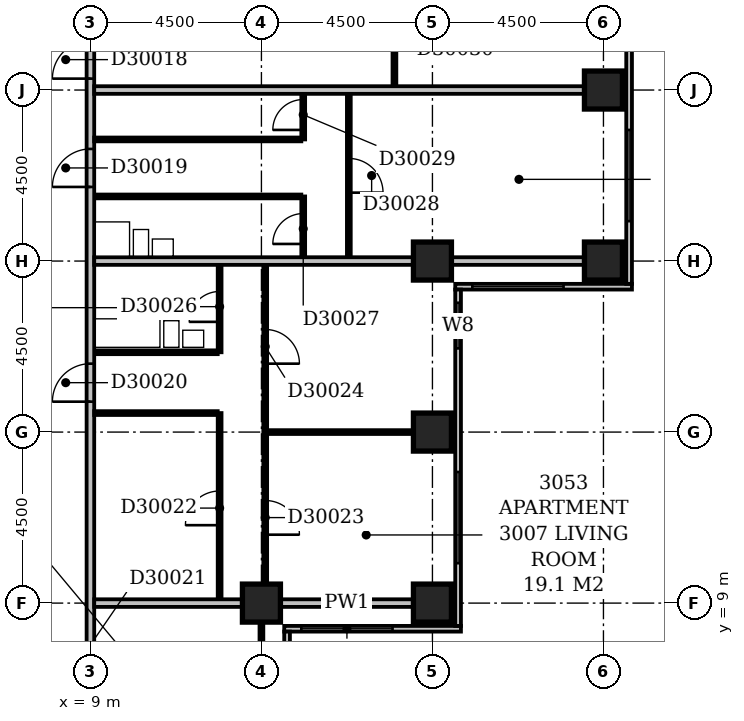
"""IFC4 building model, lengths in metres.
Left out: names, types, materials, properties, quantities, classifications, styles, units other than length and angle.
Written with IfcOpenShell. Run it as: python <this file> out.ifc"""

import sys

from ifc_helpers import new_model, si_unit, direction, frame, frame_2d, origin, origin_2d, place, context, subcontext, project, spatial, rectangle, extrude, element, fill, save


model = new_model("IFC4")
c1 = context("Model", 3, precision=1e-05, world=origin(), true_north=direction((0.0, 1.0)))
c2 = subcontext(c1, "Body", "Model", "MODEL_VIEW")
j1 = project(units=[si_unit("LENGTHUNIT", "METRE"), si_unit("PLANEANGLEUNIT", "RADIAN")], contexts=[c1])
p1 = place(None, origin())
s1 = spatial("IfcSite", under=j1, at=p1, CompositionType="ELEMENT")
p2 = place(p1, origin())
s2 = spatial("IfcBuilding", under=s1, at=p2, CompositionType="ELEMENT")
p3 = place(p2, frame((0.0, 0.0, 123.2)))
s3 = spatial("IfcBuildingStorey", under=s2, at=p3, CompositionType="ELEMENT", Elevation=123.2)
for number, where, z_axis, x_axis in (
    (1, (13.5, 9.0, -0.3), (0.0, 0.0, 1.0), (1.0, 0.0, 0.0)),
    (2, (18.0, 9.0, -0.3), (0.0, 0.0, 1.0), (1.0, 0.0, 0.0)),
    (3, (18.0, 13.5, -0.3), (0.0, 0.0, 1.0), (1.0, 0.0, 0.0)),
    (4, (18.0, 18.0, -0.3), (0.0, 0.0, 1.0), (1.0, 0.0, 0.0)),
    (5, (22.5, 18.0, -0.3), (0.0, 0.0, 1.0), (1.0, 0.0, 0.0)),
    (6, (22.5, 22.5, -0.3), (0.0, 0.0, 1.0), (1.0, 0.0, 0.0)),
):
    element("IfcColumn", number, at=place(p3, frame(where, z_axis=z_axis, x_axis=x_axis)), inside=s3, PredefinedType="COLUMN", context=c2, shape_type="SweptSolid", body=[
        extrude(rectangle(XDim=1.0, YDim=1.0, at=origin_2d()), origin(), (0.0, 0.0, 1.0), 3.6),
    ])
p4 = place(p3, frame((14.175, 3.9, 0.0), z_axis=(0.0, 0.0, 1.0), x_axis=(0.0, 1.0, 0.0)))
e7 = element("IfcWall", 7, at=p4, inside=s3, PredefinedType="STANDARD", context=c2, shape_type="SweptSolid", body=[
    extrude(rectangle(XDim=4.35, YDim=0.15, at=frame_2d((2.175, 0.0))), origin(), (0.0, 0.0, 1.0), 2.7),
])
p5 = place(p4, frame((1.65, 0.0, 0.6)))
e8 = element("IfcOpeningElement", 8, at=p5, cuts=e7, PredefinedType="OPENING", context=c2, shape_type="SweptSolid", body=[
    extrude(rectangle(XDim=2.4, YDim=1.8, at=frame_2d((1.2, 0.9))), frame((0.0, 0.087, 0.0), z_axis=(0.0, -1.0, 0.0), x_axis=(1.0, 0.0, 0.0)), (0.0, 0.0, 1.0), 0.174),
])
p6 = place(p3, frame((14.1, 8.325, 0.0), z_axis=(0.0, 0.0, 1.0), x_axis=(1.0, 0.0, 0.0)))
e9 = element("IfcWall", 9, at=p6, inside=s3, PredefinedType="STANDARD", context=c2, shape_type="SweptSolid", body=[
    extrude(rectangle(XDim=4.65, YDim=0.15, at=frame_2d((2.325, 0.0))), origin(), (0.0, 0.0, 1.0), 2.7),
])
p7 = place(p6, frame((0.45, 0.0, 0.6)))
e10 = element("IfcOpeningElement", 10, at=p7, cuts=e9, PredefinedType="OPENING", context=c2, shape_type="SweptSolid", body=[
    extrude(rectangle(XDim=2.4, YDim=1.8, at=frame_2d((1.2, 0.9))), frame((0.0, 0.087, 0.0), z_axis=(0.0, -1.0, 0.0), x_axis=(1.0, 0.0, 0.0)), (0.0, 0.0, 1.0), 0.174),
])
p8 = place(p3, frame((18.675, 8.4, 0.0), z_axis=(0.0, 0.0, 1.0), x_axis=(0.0, 1.0, 0.0)))
e11 = element("IfcWall", 11, at=p8, inside=s3, PredefinedType="STANDARD", context=c2, shape_type="SweptSolid", body=[
    extrude(rectangle(XDim=8.85, YDim=0.15, at=frame_2d((4.425, 0.0))), origin(), (0.0, 0.0, 1.0), 2.7),
])
p9 = place(p8, frame((1.65, 0.0, 0.6)))
e12 = element("IfcOpeningElement", 12, at=p9, cuts=e11, PredefinedType="OPENING", context=c2, shape_type="SweptSolid", body=[
    extrude(rectangle(XDim=2.4, YDim=1.8, at=frame_2d((1.2, 0.9))), frame((0.0, 0.087, 0.0), z_axis=(0.0, -1.0, 0.0), x_axis=(1.0, 0.0, 0.0)), (0.0, 0.0, 1.0), 0.174),
])
p10 = place(p8, frame((7.302, 0.0, 0.6)))
e13 = element("IfcOpeningElement", 13, at=p10, cuts=e11, PredefinedType="OPENING", context=c2, shape_type="SweptSolid", body=[
    extrude(rectangle(XDim=1.2, YDim=1.8, at=frame_2d((0.6, 0.9))), frame((0.0, 0.087, 0.0), z_axis=(0.0, -1.0, 0.0), x_axis=(1.0, 0.0, 0.0)), (0.0, 0.0, 1.0), 0.174),
])
p11 = place(p3, frame((18.6, 17.325, 0.0), z_axis=(0.0, 0.0, 1.0), x_axis=(1.0, 0.0, 0.0)))
e14 = element("IfcWall", 14, at=p11, inside=s3, PredefinedType="STANDARD", context=c2, shape_type="SweptSolid", body=[
    extrude(rectangle(XDim=4.65, YDim=0.15, at=frame_2d((2.325, 0.0))), origin(), (0.0, 0.0, 1.0), 2.7),
])
p12 = place(p11, frame((0.45, 0.0, 0.6)))
e15 = element("IfcOpeningElement", 15, at=p12, cuts=e14, PredefinedType="OPENING", context=c2, shape_type="SweptSolid", body=[
    extrude(rectangle(XDim=2.4, YDim=1.8, at=frame_2d((1.2, 0.9))), frame((0.0, 0.087, 0.0), z_axis=(0.0, -1.0, 0.0), x_axis=(1.0, 0.0, 0.0)), (0.0, 0.0, 1.0), 0.174),
])
p13 = place(p3, frame((23.175, 17.4, 0.0), z_axis=(0.0, 0.0, 1.0), x_axis=(0.0, 1.0, 0.0)))
e16 = element("IfcWall", 16, at=p13, inside=s3, PredefinedType="STANDARD", context=c2, shape_type="SweptSolid", body=[
    extrude(rectangle(XDim=17.85, YDim=0.15, at=frame_2d((8.925, 0.0))), origin(), (0.0, 0.0, 1.0), 2.7),
])
p14 = place(p13, frame((1.65, 0.0, 0.6)))
e17 = element("IfcOpeningElement", 17, at=p14, cuts=e16, PredefinedType="OPENING", context=c2, shape_type="SweptSolid", body=[
    extrude(rectangle(XDim=2.4, YDim=1.8, at=frame_2d((1.2, 0.9))), frame((0.0, 0.087, 0.0), z_axis=(0.0, -1.0, 0.0), x_axis=(1.0, 0.0, 0.0)), (0.0, 0.0, 1.0), 0.174),
])
p15 = place(p13, frame((6.15, 0.0, 0.6)))
e18 = element("IfcOpeningElement", 18, at=p15, cuts=e16, PredefinedType="OPENING", context=c2, shape_type="SweptSolid", body=[
    extrude(rectangle(XDim=2.4, YDim=1.8, at=frame_2d((1.2, 0.9))), frame((0.0, 0.087, 0.0), z_axis=(0.0, -1.0, 0.0), x_axis=(1.0, 0.0, 0.0)), (0.0, 0.0, 1.0), 0.174),
])
p16 = place(p13, frame((10.433, 0.0, 0.6)))
e19 = element("IfcOpeningElement", 19, at=p16, cuts=e16, PredefinedType="OPENING", context=c2, shape_type="SweptSolid", body=[
    extrude(rectangle(XDim=1.5, YDim=1.8, at=frame_2d((0.75, 0.9))), frame((0.0, 0.087, 0.0), z_axis=(0.0, -1.0, 0.0), x_axis=(1.0, 0.0, 0.0)), (0.0, 0.0, 1.0), 0.174),
])
p17 = place(p13, frame((15.15, 0.0, 0.6)))
e20 = element("IfcOpeningElement", 20, at=p17, cuts=e16, PredefinedType="OPENING", context=c2, shape_type="SweptSolid", body=[
    extrude(rectangle(XDim=2.4, YDim=1.8, at=frame_2d((1.2, 0.9))), frame((0.0, 0.087, 0.0), z_axis=(0.0, -1.0, 0.0), x_axis=(1.0, 0.0, 0.0)), (0.0, 0.0, 1.0), 0.174),
])
p18 = place(p3, frame((9.0, 5.0, 0.0), z_axis=(0.0, 0.0, 1.0), x_axis=(0.0, 1.0, 0.0)))
e21 = element("IfcWall", 21, at=p18, inside=s3, PredefinedType="PARTITIONING", context=c2, shape_type="SweptSolid", body=[
    extrude(rectangle(XDim=27.75, YDim=0.2, at=frame_2d((13.875, 0.0))), origin(), (0.0, 0.0, 1.0), 3.3),
])
p19 = place(p18, frame((17.8, 0.0, 0.0)))
e22 = element("IfcOpeningElement", 22, at=p19, cuts=e21, PredefinedType="OPENING", context=c2, shape_type="SweptSolid", body=[
    extrude(rectangle(XDim=1.0, YDim=2.1, at=frame_2d((0.5, 1.05))), frame((0.0, 0.112, 0.0), z_axis=(0.0, -1.0, 0.0), x_axis=(1.0, 0.0, 0.0)), (0.0, 0.0, 1.0), 0.224),
])
p20 = place(p18, frame((14.95, 0.0, 0.0)))
e23 = element("IfcOpeningElement", 23, at=p20, cuts=e21, PredefinedType="OPENING", context=c2, shape_type="SweptSolid", body=[
    extrude(rectangle(XDim=1.0, YDim=2.1, at=frame_2d((0.5, 1.05))), frame((0.0, 0.112, 0.0), z_axis=(0.0, -1.0, 0.0), x_axis=(1.0, 0.0, 0.0)), (0.0, 0.0, 1.0), 0.224),
])
p21 = place(p18, frame((9.3, 0.0, 0.0)))
e24 = element("IfcOpeningElement", 24, at=p21, cuts=e21, PredefinedType="OPENING", context=c2, shape_type="SweptSolid", body=[
    extrude(rectangle(XDim=1.0, YDim=2.1, at=frame_2d((0.5, 1.05))), frame((0.0, 0.112, 0.0), z_axis=(0.0, -1.0, 0.0), x_axis=(1.0, 0.0, 0.0)), (0.0, 0.0, 1.0), 0.224),
])
p22 = place(p18, frame((1.5, 0.0, 0.0)))
e25 = element("IfcOpeningElement", 25, at=p22, cuts=e21, PredefinedType="OPENING", context=c2, shape_type="SweptSolid", body=[
    extrude(rectangle(XDim=0.9, YDim=2.1, at=frame_2d((0.45, 1.05))), frame((0.0, 0.112, 0.0), z_axis=(0.0, -1.0, 0.0), x_axis=(1.0, 0.0, 0.0)), (0.0, 0.0, 1.0), 0.224),
])
p23 = place(p3, frame((13.5, 5.0, 0.0), z_axis=(0.0, 0.0, 1.0), x_axis=(0.0, 1.0, 0.0)))
e26 = element("IfcWall", 26, at=p23, inside=s3, PredefinedType="PARTITIONING", context=c2, shape_type="SweptSolid", body=[
    extrude(rectangle(XDim=3.5, YDim=0.1, at=frame_2d((1.75, 0.0))), origin(), (0.0, 0.0, 1.0), 2.7),
])
p24 = place(p3, frame((9.1, 9.0, 0.0), z_axis=(0.0, 0.0, 1.0), x_axis=(1.0, 0.0, 0.0)))
e27 = element("IfcWall", 27, at=p24, inside=s3, PredefinedType="PARTITIONING", context=c2, shape_type="SweptSolid", body=[
    extrude(rectangle(XDim=3.9, YDim=0.2, at=frame_2d((1.95, 0.0))), origin(), (0.0, 0.0, 1.0), 3.3),
])
p25 = place(p3, frame((14.0, 9.0, 0.0), z_axis=(0.0, 0.0, 1.0), x_axis=(1.0, 0.0, 0.0)))
e28 = element("IfcWall", 28, at=p25, inside=s3, PredefinedType="PARTITIONING", context=c2, shape_type="SweptSolid", body=[
    extrude(rectangle(XDim=3.5, YDim=0.2, at=frame_2d((1.75, 0.0))), origin(), (0.0, 0.0, 1.0), 2.7),
])
p26 = place(p3, frame((12.4, 9.1, 0.0), z_axis=(0.0, 0.0, 1.0), x_axis=(0.0, 1.0, 0.0)))
e29 = element("IfcWall", 29, at=p26, inside=s3, PredefinedType="PARTITIONING", context=c2, shape_type="SweptSolid", body=[
    extrude(rectangle(XDim=4.9, YDim=0.1, at=frame_2d((2.45, 0.0))), origin(), (0.0, 0.0, 1.0), 3.3),
])
p27 = place(p26, frame((1.95, 0.0, 0.0)))
e30 = element("IfcOpeningElement", 30, at=p27, cuts=e29, PredefinedType="OPENING", context=c2, shape_type="SweptSolid", body=[
    extrude(rectangle(XDim=0.9, YDim=2.1, at=frame_2d((0.45, 1.05))), frame((0.0, 0.062, 0.0), z_axis=(0.0, -1.0, 0.0), x_axis=(1.0, 0.0, 0.0)), (0.0, 0.0, 1.0), 0.124),
])
p28 = place(p3, frame((13.6, 9.5, 0.0), z_axis=(0.0, 0.0, 1.0), x_axis=(0.0, 1.0, 0.0)))
e31 = element("IfcWall", 31, at=p28, inside=s3, PredefinedType="PARTITIONING", context=c2, shape_type="SweptSolid", body=[
    extrude(rectangle(XDim=8.4, YDim=0.1, at=frame_2d((4.2, 0.0))), origin(), (0.0, 0.0, 1.0), 3.3),
])
p29 = place(p28, frame((1.3, 0.0, 0.0)))
e32 = element("IfcOpeningElement", 32, at=p29, cuts=e31, PredefinedType="OPENING", context=c2, shape_type="SweptSolid", body=[
    extrude(rectangle(XDim=0.9, YDim=2.1, at=frame_2d((0.45, 1.05))), frame((0.0, 0.062, 0.0), z_axis=(0.0, -1.0, 0.0), x_axis=(1.0, 0.0, 0.0)), (0.0, 0.0, 1.0), 0.124),
])
p30 = place(p28, frame((5.8, 0.0, 0.0)))
e33 = element("IfcOpeningElement", 33, at=p30, cuts=e31, PredefinedType="OPENING", context=c2, shape_type="SweptSolid", body=[
    extrude(rectangle(XDim=0.9, YDim=2.1, at=frame_2d((0.45, 1.05))), frame((0.0, 0.062, 0.0), z_axis=(0.0, -1.0, 0.0), x_axis=(1.0, 0.0, 0.0)), (0.0, 0.0, 1.0), 0.124),
])
p31 = place(p3, frame((13.65, 13.5, 0.0), z_axis=(0.0, 0.0, 1.0), x_axis=(1.0, 0.0, 0.0)))
e34 = element("IfcWall", 34, at=p31, inside=s3, PredefinedType="PARTITIONING", context=c2, shape_type="SweptSolid", body=[
    extrude(rectangle(XDim=3.85, YDim=0.1, at=frame_2d((1.925, 0.0))), origin(), (0.0, 0.0, 1.0), 3.3),
])
p32 = place(p3, frame((9.1, 14.0, 0.0), z_axis=(0.0, 0.0, 1.0), x_axis=(1.0, 0.0, 0.0)))
e35 = element("IfcWall", 35, at=p32, inside=s3, PredefinedType="PARTITIONING", context=c2, shape_type="SweptSolid", body=[
    extrude(rectangle(XDim=3.25, YDim=0.1, at=frame_2d((1.625, 0.0))), origin(), (0.0, 0.0, 1.0), 3.3),
])
p33 = place(p3, frame((9.1, 15.6, 0.0), z_axis=(0.0, 0.0, 1.0), x_axis=(1.0, 0.0, 0.0)))
e36 = element("IfcWall", 36, at=p33, inside=s3, PredefinedType="PLUMBINGWALL", context=c2, shape_type="SweptSolid", body=[
    extrude(rectangle(XDim=3.25, YDim=0.1, at=frame_2d((1.625, 0.0))), origin(), (0.0, 0.0, 1.0), 3.3),
])
p34 = place(p3, frame((12.4, 15.6, 0.0), z_axis=(0.0, 0.0, 1.0), x_axis=(0.0, 1.0, 0.0)))
e37 = element("IfcWall", 37, at=p34, inside=s3, PredefinedType="PARTITIONING", context=c2, shape_type="SweptSolid", body=[
    extrude(rectangle(XDim=2.3, YDim=0.1, at=frame_2d((1.15, 0.0))), origin(), (0.0, 0.0, 1.0), 3.3),
])
p35 = place(p34, frame((0.8, 0.0, 0.0)))
e38 = element("IfcOpeningElement", 38, at=p35, cuts=e37, PredefinedType="OPENING", context=c2, shape_type="SweptSolid", body=[
    extrude(rectangle(XDim=0.8, YDim=2.1, at=frame_2d((0.4, 1.05))), frame((0.0, 0.062, 0.0), z_axis=(0.0, -1.0, 0.0), x_axis=(1.0, 0.0, 0.0)), (0.0, 0.0, 1.0), 0.124),
])
p36 = place(p3, frame((9.1, 18.0, 0.0), z_axis=(0.0, 0.0, 1.0), x_axis=(1.0, 0.0, 0.0)))
e39 = element("IfcWall", 39, at=p36, inside=s3, PredefinedType="PARTITIONING", context=c2, shape_type="SweptSolid", body=[
    extrude(rectangle(XDim=8.4, YDim=0.2, at=frame_2d((4.2, 0.0))), origin(), (0.0, 0.0, 1.0), 2.6),
])
p37 = place(p3, frame((18.5, 18.0, 0.0), z_axis=(0.0, 0.0, 1.0), x_axis=(1.0, 0.0, 0.0)))
e40 = element("IfcWall", 40, at=p37, inside=s3, PredefinedType="PARTITIONING", context=c2, shape_type="SweptSolid", body=[
    extrude(rectangle(XDim=3.5, YDim=0.2, at=frame_2d((1.75, 0.0))), origin(), (0.0, 0.0, 1.0), 2.7),
])
p38 = place(p3, frame((14.6, 18.1, 0.0), z_axis=(0.0, 0.0, 1.0), x_axis=(0.0, 1.0, 0.0)))
e41 = element("IfcWall", 41, at=p38, inside=s3, PredefinedType="PARTITIONING", context=c2, shape_type="SweptSolid", body=[
    extrude(rectangle(XDim=1.6, YDim=0.1, at=frame_2d((0.8, 0.0))), origin(), (0.0, 0.0, 1.0), 3.3),
])
p39 = place(p38, frame((0.35, 0.0, 0.0)))
e42 = element("IfcOpeningElement", 42, at=p39, cuts=e41, PredefinedType="OPENING", context=c2, shape_type="SweptSolid", body=[
    extrude(rectangle(XDim=0.8, YDim=2.1, at=frame_2d((0.4, 1.05))), frame((0.0, 0.062, 0.0), z_axis=(0.0, -1.0, 0.0), x_axis=(1.0, 0.0, 0.0)), (0.0, 0.0, 1.0), 0.124),
])
p40 = place(p3, frame((15.8, 18.1, 0.0), z_axis=(0.0, 0.0, 1.0), x_axis=(0.0, 1.0, 0.0)))
e43 = element("IfcWall", 43, at=p40, inside=s3, PredefinedType="PARTITIONING", context=c2, shape_type="SweptSolid", body=[
    extrude(rectangle(XDim=4.3, YDim=0.1, at=frame_2d((2.15, 0.0))), origin(), (0.0, 0.0, 1.0), 3.3),
])
p41 = place(p40, frame((1.7, 0.0, 0.0)))
e44 = element("IfcOpeningElement", 44, at=p41, cuts=e43, PredefinedType="OPENING", context=c2, shape_type="SweptSolid", body=[
    extrude(rectangle(XDim=0.9, YDim=2.1, at=frame_2d((0.45, 1.05))), frame((0.0, 0.062, 0.0), z_axis=(0.0, -1.0, 0.0), x_axis=(1.0, 0.0, 0.0)), (0.0, 0.0, 1.0), 0.124),
])
p42 = place(p3, frame((9.1, 19.7, 0.0), z_axis=(0.0, 0.0, 1.0), x_axis=(1.0, 0.0, 0.0)))
e45 = element("IfcWall", 45, at=p42, inside=s3, PredefinedType="PLUMBINGWALL", context=c2, shape_type="SweptSolid", body=[
    extrude(rectangle(XDim=5.45, YDim=0.1, at=frame_2d((2.725, 0.0))), origin(), (0.0, 0.0, 1.0), 3.3),
])
p43 = place(p3, frame((9.1, 21.2, 0.0), z_axis=(0.0, 0.0, 1.0), x_axis=(1.0, 0.0, 0.0)))
e46 = element("IfcWall", 46, at=p43, inside=s3, PredefinedType="PARTITIONING", context=c2, shape_type="SweptSolid", body=[
    extrude(rectangle(XDim=5.45, YDim=0.1, at=frame_2d((2.725, 0.0))), origin(), (0.0, 0.0, 1.0), 3.3),
])
p44 = place(p3, frame((14.6, 21.2, 0.0), z_axis=(0.0, 0.0, 1.0), x_axis=(0.0, 1.0, 0.0)))
e47 = element("IfcWall", 47, at=p44, inside=s3, PredefinedType="PARTITIONING", context=c2, shape_type="SweptSolid", body=[
    extrude(rectangle(XDim=1.2, YDim=0.1, at=frame_2d((0.6, 0.0))), origin(), (0.0, 0.0, 1.0), 3.3),
])
p45 = place(p44, frame((0.25, 0.0, 0.0)))
e48 = element("IfcOpeningElement", 48, at=p45, cuts=e47, PredefinedType="OPENING", context=c2, shape_type="SweptSolid", body=[
    extrude(rectangle(XDim=0.8, YDim=2.1, at=frame_2d((0.4, 1.05))), frame((0.0, 0.062, 0.0), z_axis=(0.0, -1.0, 0.0), x_axis=(1.0, 0.0, 0.0)), (0.0, 0.0, 1.0), 0.124),
])
p46 = place(p3, frame((9.1, 22.5, 0.0), z_axis=(0.0, 0.0, 1.0), x_axis=(1.0, 0.0, 0.0)))
e49 = element("IfcWall", 49, at=p46, inside=s3, PredefinedType="PARTITIONING", context=c2, shape_type="SweptSolid", body=[
    extrude(rectangle(XDim=12.9, YDim=0.2, at=frame_2d((6.45, 0.0))), origin(), (0.0, 0.0, 1.0), 3.3),
])
p47 = place(p3, frame((17.0, 22.6, 0.0), z_axis=(0.0, 0.0, 1.0), x_axis=(0.0, 1.0, 0.0)))
e50 = element("IfcWall", 50, at=p47, inside=s3, PredefinedType="PARTITIONING", context=c2, shape_type="SweptSolid", body=[
    extrude(rectangle(XDim=8.8, YDim=0.1, at=frame_2d((4.4, 0.0))), origin(), (0.0, 0.0, 1.0), 3.3),
])
p48 = place(p47, frame((1.7, 0.0, 0.0)))
e51 = element("IfcOpeningElement", 51, at=p48, cuts=e50, PredefinedType="OPENING", context=c2, shape_type="SweptSolid", body=[
    extrude(rectangle(XDim=0.9, YDim=2.1, at=frame_2d((0.45, 1.05))), frame((0.0, 0.062, 0.0), z_axis=(0.0, -1.0, 0.0), x_axis=(1.0, 0.0, 0.0)), (0.0, 0.0, 1.0), 0.124),
])
p49 = place(p47, frame((6.2, 0.0, 0.0)))
e52 = element("IfcOpeningElement", 52, at=p49, cuts=e50, PredefinedType="OPENING", context=c2, shape_type="SweptSolid", body=[
    extrude(rectangle(XDim=0.9, YDim=2.1, at=frame_2d((0.45, 1.05))), frame((0.0, 0.062, 0.0), z_axis=(0.0, -1.0, 0.0), x_axis=(1.0, 0.0, 0.0)), (0.0, 0.0, 1.0), 0.124),
])
p50 = place(p7, origin())
e53 = element("IfcWindow", 53, at=p50, inside=s3, PartitioningType="SINGLE_PANEL", PredefinedType="WINDOW", context=c2, shape_type="SweptSolid", body=[
    extrude(rectangle(XDim=2.4, YDim=1.8, at=frame_2d((1.2, 0.9))), frame((0.0, 0.03, 0.0), z_axis=(0.0, -1.0, 0.0), x_axis=(1.0, 0.0, 0.0)), (0.0, 0.0, 1.0), 0.06),
])
fill(e10, e53)
p51 = place(p9, origin())
e54 = element("IfcWindow", 54, at=p51, inside=s3, PartitioningType="SINGLE_PANEL", PredefinedType="WINDOW", context=c2, shape_type="SweptSolid", body=[
    extrude(rectangle(XDim=2.4, YDim=1.8, at=frame_2d((1.2, 0.9))), frame((0.0, 0.03, 0.0), z_axis=(0.0, -1.0, 0.0), x_axis=(1.0, 0.0, 0.0)), (0.0, 0.0, 1.0), 0.06),
])
fill(e12, e54)
p52 = place(p10, origin())
e55 = element("IfcWindow", 55, at=p52, inside=s3, PartitioningType="SINGLE_PANEL", PredefinedType="WINDOW", context=c2, shape_type="SweptSolid", body=[
    extrude(rectangle(XDim=1.2, YDim=1.8, at=frame_2d((0.6, 0.9))), frame((0.0, 0.03, 0.0), z_axis=(0.0, -1.0, 0.0), x_axis=(1.0, 0.0, 0.0)), (0.0, 0.0, 1.0), 0.06),
])
fill(e13, e55)
p53 = place(p12, origin())
e56 = element("IfcWindow", 56, at=p53, inside=s3, PartitioningType="SINGLE_PANEL", PredefinedType="WINDOW", context=c2, shape_type="SweptSolid", body=[
    extrude(rectangle(XDim=2.4, YDim=1.8, at=frame_2d((1.2, 0.9))), frame((0.0, 0.03, 0.0), z_axis=(0.0, -1.0, 0.0), x_axis=(1.0, 0.0, 0.0)), (0.0, 0.0, 1.0), 0.06),
])
fill(e15, e56)
p54 = place(p14, origin())
e57 = element("IfcWindow", 57, at=p54, inside=s3, PartitioningType="SINGLE_PANEL", PredefinedType="WINDOW", context=c2, shape_type="SweptSolid", body=[
    extrude(rectangle(XDim=2.4, YDim=1.8, at=frame_2d((1.2, 0.9))), frame((0.0, 0.03, 0.0), z_axis=(0.0, -1.0, 0.0), x_axis=(1.0, 0.0, 0.0)), (0.0, 0.0, 1.0), 0.06),
])
fill(e17, e57)
p55 = place(p19, origin())
e58 = element("IfcDoor", 58, at=p55, inside=s3, OperationType="SINGLE_SWING_LEFT", PredefinedType="DOOR", context=c2, shape_type="SweptSolid", body=[
    extrude(rectangle(XDim=1.0, YDim=2.1, at=frame_2d((0.5, 1.05))), frame((0.0, 0.025, 0.0), z_axis=(0.0, -1.0, 0.0), x_axis=(1.0, 0.0, 0.0)), (0.0, 0.0, 1.0), 0.05),
])
fill(e22, e58)
p56 = place(p20, origin())
e59 = element("IfcDoor", 59, at=p56, inside=s3, OperationType="SINGLE_SWING_LEFT", PredefinedType="DOOR", context=c2, shape_type="SweptSolid", body=[
    extrude(rectangle(XDim=1.0, YDim=2.1, at=frame_2d((0.5, 1.05))), frame((0.0, 0.025, 0.0), z_axis=(0.0, -1.0, 0.0), x_axis=(1.0, 0.0, 0.0)), (0.0, 0.0, 1.0), 0.05),
])
fill(e23, e59)
p57 = place(p21, origin())
e60 = element("IfcDoor", 60, at=p57, inside=s3, OperationType="SINGLE_SWING_LEFT", PredefinedType="DOOR", context=c2, shape_type="SweptSolid", body=[
    extrude(rectangle(XDim=1.0, YDim=2.1, at=frame_2d((0.5, 1.05))), frame((0.0, 0.025, 0.0), z_axis=(0.0, -1.0, 0.0), x_axis=(1.0, 0.0, 0.0)), (0.0, 0.0, 1.0), 0.05),
])
fill(e24, e60)
p58 = place(p27, origin())
e61 = element("IfcDoor", 61, at=p58, inside=s3, OperationType="SINGLE_SWING_LEFT", PredefinedType="DOOR", context=c2, shape_type="SweptSolid", body=[
    extrude(rectangle(XDim=0.9, YDim=2.1, at=frame_2d((0.45, 1.05))), frame((0.0, 0.025, 0.0), z_axis=(0.0, -1.0, 0.0), x_axis=(1.0, 0.0, 0.0)), (0.0, 0.0, 1.0), 0.05),
])
fill(e30, e61)
p59 = place(p29, frame((0.9, 0.0, 0.0), z_axis=(0.0, 0.0, 1.0), x_axis=(-1.0, 0.0, 0.0)))
e62 = element("IfcDoor", 62, at=p59, inside=s3, OperationType="SINGLE_SWING_RIGHT", PredefinedType="DOOR", context=c2, shape_type="SweptSolid", body=[
    extrude(rectangle(XDim=0.9, YDim=2.1, at=frame_2d((0.45, 1.05))), frame((0.0, 0.025, 0.0), z_axis=(0.0, -1.0, 0.0), x_axis=(1.0, 0.0, 0.0)), (0.0, 0.0, 1.0), 0.05),
])
fill(e32, e62)
p60 = place(p30, frame((0.9, 0.0, 0.0), z_axis=(0.0, 0.0, 1.0), x_axis=(-1.0, 0.0, 0.0)))
e63 = element("IfcDoor", 63, at=p60, inside=s3, OperationType="SINGLE_SWING_RIGHT", PredefinedType="DOOR", context=c2, shape_type="SweptSolid", body=[
    extrude(rectangle(XDim=0.9, YDim=2.1, at=frame_2d((0.45, 1.05))), frame((0.0, 0.025, 0.0), z_axis=(0.0, -1.0, 0.0), x_axis=(1.0, 0.0, 0.0)), (0.0, 0.0, 1.0), 0.05),
])
fill(e33, e63)
p61 = place(p35, origin())
e64 = element("IfcDoor", 64, at=p61, inside=s3, OperationType="SINGLE_SWING_LEFT", PredefinedType="DOOR", context=c2, shape_type="SweptSolid", body=[
    extrude(rectangle(XDim=0.8, YDim=2.1, at=frame_2d((0.4, 1.05))), frame((0.0, 0.025, 0.0), z_axis=(0.0, -1.0, 0.0), x_axis=(1.0, 0.0, 0.0)), (0.0, 0.0, 1.0), 0.05),
])
fill(e38, e64)
p62 = place(p39, origin())
e65 = element("IfcDoor", 65, at=p62, inside=s3, OperationType="SINGLE_SWING_LEFT", PredefinedType="DOOR", context=c2, shape_type="SweptSolid", body=[
    extrude(rectangle(XDim=0.8, YDim=2.1, at=frame_2d((0.4, 1.05))), frame((0.0, 0.025, 0.0), z_axis=(0.0, -1.0, 0.0), x_axis=(1.0, 0.0, 0.0)), (0.0, 0.0, 1.0), 0.05),
])
fill(e42, e65)
p63 = place(p41, frame((0.9, 0.0, 0.0), z_axis=(0.0, 0.0, 1.0), x_axis=(-1.0, 0.0, 0.0)))
e66 = element("IfcDoor", 66, at=p63, inside=s3, OperationType="SINGLE_SWING_RIGHT", PredefinedType="DOOR", context=c2, shape_type="SweptSolid", body=[
    extrude(rectangle(XDim=0.9, YDim=2.1, at=frame_2d((0.45, 1.05))), frame((0.0, 0.025, 0.0), z_axis=(0.0, -1.0, 0.0), x_axis=(1.0, 0.0, 0.0)), (0.0, 0.0, 1.0), 0.05),
])
fill(e44, e66)
p64 = place(p45, origin())
e67 = element("IfcDoor", 67, at=p64, inside=s3, OperationType="SINGLE_SWING_LEFT", PredefinedType="DOOR", context=c2, shape_type="SweptSolid", body=[
    extrude(rectangle(XDim=0.8, YDim=2.1, at=frame_2d((0.4, 1.05))), frame((0.0, 0.025, 0.0), z_axis=(0.0, -1.0, 0.0), x_axis=(1.0, 0.0, 0.0)), (0.0, 0.0, 1.0), 0.05),
])
fill(e48, e67)
save(model, sys.argv[1])
